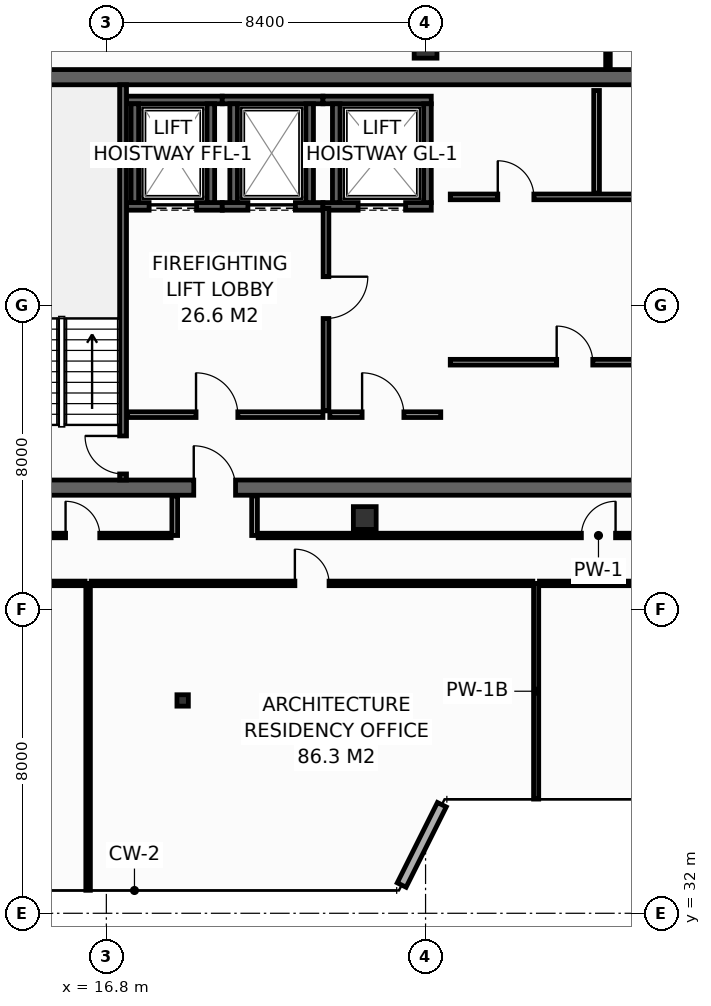
"""IFC4 building model, lengths in metres.
Left out: names, types, materials, properties, quantities, classifications, styles, units other than length and angle.
Written with IfcOpenShell. Run it as: python <this file> out.ifc"""

import sys

from ifc_helpers import new_model, si_unit, direction, frame, frame_2d, origin, origin_2d, place, context, subcontext, project, spatial, rectangle, hollow_rectangle, extrude, element, fill, save


model = new_model("IFC4")
c1 = context("Model", 3, precision=1e-05, world=origin(), true_north=direction((0.0, 1.0)))
c2 = subcontext(c1, "Body", "Model", "MODEL_VIEW")
j1 = project(units=[si_unit("LENGTHUNIT", "METRE"), si_unit("PLANEANGLEUNIT", "RADIAN")], contexts=[c1])
p1 = place(None, origin())
s1 = spatial("IfcSite", under=j1, at=p1, CompositionType="ELEMENT")
p2 = place(p1, origin())
s2 = spatial("IfcBuilding", under=s1, at=p2, CompositionType="ELEMENT")
p3 = place(p2, frame((0.0, 0.0, 302.8)))
s3 = spatial("IfcBuildingStorey", under=s2, at=p3, CompositionType="ELEMENT", Elevation=302.8)
p4 = place(p3, frame((13.7, 43.2, 0.0), z_axis=(0.0, 0.0, 1.0), x_axis=(1.0, 0.0, 0.0)))
e1 = element("IfcWall", 1, at=p4, inside=s3, PredefinedType="SHEAR", context=c2, shape_type="SweptSolid", body=[
    extrude(rectangle(XDim=32.5, YDim=0.4, at=frame_2d((16.25, 0.0))), origin(), (0.0, 0.0, 1.0), 3.55),
])
p5 = place(p4, frame((5.4, 0.0, 0.0)))
e2 = element("IfcOpeningElement", 2, at=p5, cuts=e1, PredefinedType="OPENING", context=c2, shape_type="SweptSolid", body=[
    extrude(rectangle(XDim=1.1, YDim=2.15, at=frame_2d((0.55, 1.075))), frame((0.0, 0.21, 0.0), z_axis=(0.0, -1.0, 0.0), x_axis=(1.0, 0.0, 0.0)), (0.0, 0.0, 1.0), 0.42),
])
p6 = place(p4, frame((25.6, 0.0, 0.0)))
e3 = element("IfcOpeningElement", 3, at=p6, cuts=e1, PredefinedType="OPENING", context=c2, shape_type="SweptSolid", body=[
    extrude(rectangle(XDim=1.1, YDim=2.15, at=frame_2d((0.55, 1.075))), frame((0.0, 0.21, 0.0), z_axis=(0.0, -1.0, 0.0), x_axis=(1.0, 0.0, 0.0)), (0.0, 0.0, 1.0), 0.42),
])
p7 = place(p3, frame((13.7, 54.0, 0.0), z_axis=(0.0, 0.0, 1.0), x_axis=(1.0, 0.0, 0.0)))
e4 = element("IfcWall", 4, at=p7, inside=s3, PredefinedType="SHEAR", context=c2, shape_type="SweptSolid", body=[
    extrude(rectangle(XDim=32.5, YDim=0.4, at=frame_2d((16.25, 0.0))), origin(), (0.0, 0.0, 1.0), 3.55),
])
for number, where, z_axis, x_axis in (
    (5, (25.2, 54.8, 0.0), (0.0, 0.0, 1.0), (1.0, 0.0, 0.0)),
    (6, (23.6, 42.4, 0.0), (0.0, 0.0, 1.0), (1.0, 0.0, 0.0)),
):
    element("IfcColumn", number, at=place(p3, frame(where, z_axis=z_axis, x_axis=x_axis)), inside=s3, PredefinedType="COLUMN", context=c2, shape_type="SweptSolid", body=[
        extrude(hollow_rectangle(XDim=0.6, YDim=0.6, WallThickness=0.028, at=origin_2d()), origin(), (0.0, 0.0, 1.0), 3.8),
    ])
p8 = place(p3, frame((18.808, 37.6, 0.0), z_axis=(0.0, 0.0, 1.0), x_axis=(1.0, 0.0, 0.0)))
e7 = element("IfcColumn", 7, at=p8, inside=s3, PredefinedType="COLUMN", context=c2, shape_type="SweptSolid", body=[
    extrude(hollow_rectangle(XDim=0.3, YDim=0.3, WallThickness=0.012, at=origin_2d()), origin(), (0.0, 0.0, 1.0), 3.8),
])
p9 = place(p3, frame((17.33, 50.6, 0.0), z_axis=(0.0, 0.0, 1.0), x_axis=(1.0, 0.0, 0.0)))
e8 = element("IfcWall", 8, at=p9, inside=s3, PredefinedType="SHEAR", context=c2, shape_type="SweptSolid", body=[
    extrude(rectangle(XDim=2.52, YDim=0.2, at=frame_2d((1.26, 0.0))), origin(), (0.0, 0.0, 1.0), 3.55),
])
p10 = place(p9, frame((0.595, 0.0, 0.0)))
e9 = element("IfcOpeningElement", 9, at=p10, cuts=e8, PredefinedType="OPENING", context=c2, shape_type="SweptSolid", body=[
    extrude(rectangle(XDim=1.25, YDim=2.3, at=frame_2d((0.625, 1.15))), frame((0.0, 0.11, 0.0), z_axis=(0.0, -1.0, 0.0), x_axis=(1.0, 0.0, 0.0)), (0.0, 0.0, 1.0), 0.22),
])
p11 = place(p3, frame((17.33, 53.4, 0.0), z_axis=(0.0, 0.0, 1.0), x_axis=(1.0, 0.0, 0.0)))
e10 = element("IfcWall", 10, at=p11, inside=s3, PredefinedType="SHEAR", context=c2, shape_type="SweptSolid", body=[
    extrude(rectangle(XDim=2.52, YDim=0.2, at=frame_2d((1.26, 0.0))), origin(), (0.0, 0.0, 1.0), 3.55),
])
for number, where, z_axis, x_axis in (
    (11, (17.55, 50.7, 0.0), (0.0, 0.0, 1.0), (0.0, 1.0, 0.0)),
    (12, (19.55, 50.7, 0.0), (0.0, 0.0, 1.0), (0.0, 1.0, 0.0)),
):
    element("IfcWall", number, at=place(p3, frame(where, z_axis=z_axis, x_axis=x_axis)), inside=s3, PredefinedType="SHEAR", context=c2, shape_type="SweptSolid", body=[
        extrude(rectangle(XDim=2.6, YDim=0.2, at=frame_2d((1.3, 0.0))), origin(), (0.0, 0.0, 1.0), 3.55),
    ])
p12 = place(p3, frame((19.85, 50.6, 0.0), z_axis=(0.0, 0.0, 1.0), x_axis=(1.0, 0.0, 0.0)))
e13 = element("IfcWall", 13, at=p12, inside=s3, PredefinedType="SHEAR", context=c2, shape_type="SweptSolid", body=[
    extrude(rectangle(XDim=2.65, YDim=0.2, at=frame_2d((1.325, 0.0))), origin(), (0.0, 0.0, 1.0), 3.55),
])
p13 = place(p12, frame((0.675, 0.0, 0.0)))
e14 = element("IfcOpeningElement", 14, at=p13, cuts=e13, PredefinedType="OPENING", context=c2, shape_type="SweptSolid", body=[
    extrude(rectangle(XDim=1.25, YDim=2.3, at=frame_2d((0.625, 1.15))), frame((0.0, 0.11, 0.0), z_axis=(0.0, -1.0, 0.0), x_axis=(1.0, 0.0, 0.0)), (0.0, 0.0, 1.0), 0.22),
])
p14 = place(p3, frame((19.85, 53.4, 0.0), z_axis=(0.0, 0.0, 1.0), x_axis=(1.0, 0.0, 0.0)))
e15 = element("IfcWall", 15, at=p14, inside=s3, PredefinedType="SHEAR", context=c2, shape_type="SweptSolid", body=[
    extrude(rectangle(XDim=2.65, YDim=0.2, at=frame_2d((1.325, 0.0))), origin(), (0.0, 0.0, 1.0), 3.55),
])
for number, where, z_axis, x_axis in (
    (16, (20.15, 50.7, 0.0), (0.0, 0.0, 1.0), (0.0, 1.0, 0.0)),
    (17, (22.15, 50.7, 0.0), (0.0, 0.0, 1.0), (0.0, 1.0, 0.0)),
):
    element("IfcWall", number, at=place(p3, frame(where, z_axis=z_axis, x_axis=x_axis)), inside=s3, PredefinedType="SHEAR", context=c2, shape_type="SweptSolid", body=[
        extrude(rectangle(XDim=2.6, YDim=0.2, at=frame_2d((1.3, 0.0))), origin(), (0.0, 0.0, 1.0), 3.55),
    ])
p15 = place(p3, frame((22.5, 50.6, 0.0), z_axis=(0.0, 0.0, 1.0), x_axis=(1.0, 0.0, 0.0)))
e18 = element("IfcWall", 18, at=p15, inside=s3, PredefinedType="SHEAR", context=c2, shape_type="SweptSolid", body=[
    extrude(rectangle(XDim=2.85, YDim=0.2, at=frame_2d((1.425, 0.0))), origin(), (0.0, 0.0, 1.0), 3.55),
])
p16 = place(p15, frame((0.925, 0.0, 0.0)))
e19 = element("IfcOpeningElement", 19, at=p16, cuts=e18, PredefinedType="OPENING", context=c2, shape_type="SweptSolid", body=[
    extrude(rectangle(XDim=1.25, YDim=2.3, at=frame_2d((0.625, 1.15))), frame((0.0, 0.11, 0.0), z_axis=(0.0, -1.0, 0.0), x_axis=(1.0, 0.0, 0.0)), (0.0, 0.0, 1.0), 0.22),
])
p17 = place(p3, frame((22.5, 53.4, 0.0), z_axis=(0.0, 0.0, 1.0), x_axis=(1.0, 0.0, 0.0)))
e20 = element("IfcWall", 20, at=p17, inside=s3, PredefinedType="SHEAR", context=c2, shape_type="SweptSolid", body=[
    extrude(rectangle(XDim=2.85, YDim=0.2, at=frame_2d((1.425, 0.0))), origin(), (0.0, 0.0, 1.0), 3.55),
])
for number, where, z_axis, x_axis in (
    (21, (22.85, 50.7, 0.0), (0.0, 0.0, 1.0), (0.0, 1.0, 0.0)),
    (22, (25.25, 50.7, 0.0), (0.0, 0.0, 1.0), (0.0, 1.0, 0.0)),
):
    element("IfcWall", number, at=place(p3, frame(where, z_axis=z_axis, x_axis=x_axis)), inside=s3, PredefinedType="SHEAR", context=c2, shape_type="SweptSolid", body=[
        extrude(rectangle(XDim=2.6, YDim=0.2, at=frame_2d((1.3, 0.0))), origin(), (0.0, 0.0, 1.0), 3.55),
    ])
p18 = place(p3, frame((17.24, 43.4, 0.0), z_axis=(0.0, 0.0, 1.0), x_axis=(0.0, 1.0, 0.0)))
e23 = element("IfcWall", 23, at=p18, inside=s3, PredefinedType="SHEAR", context=c2, shape_type="SweptSolid", body=[
    extrude(rectangle(XDim=10.4, YDim=0.18, at=frame_2d((5.2, 0.0))), origin(), (0.0, 0.0, 1.0), 3.55),
])
p19 = place(p18, frame((0.16, 0.0, 0.0)))
e24 = element("IfcOpeningElement", 24, at=p19, cuts=e23, PredefinedType="OPENING", context=c2, shape_type="SweptSolid", body=[
    extrude(rectangle(XDim=1.0, YDim=2.15, at=frame_2d((0.5, 1.075))), frame((0.0, 0.1, 0.0), z_axis=(0.0, -1.0, 0.0), x_axis=(1.0, 0.0, 0.0)), (0.0, 0.0, 1.0), 0.2),
])
p20 = place(p3, frame((17.36, 45.12, 0.0), z_axis=(0.0, 0.0, 1.0), x_axis=(1.0, 0.0, 0.0)))
e25 = element("IfcWall", 25, at=p20, inside=s3, PredefinedType="PARTITIONING", context=c2, shape_type="SweptSolid", body=[
    extrude(rectangle(XDim=5.14, YDim=0.15, at=frame_2d((2.57, 0.0))), origin(), (0.0, 0.0, 1.0), 3.55),
])
p21 = place(p20, frame((1.8, 0.0, 0.0)))
e26 = element("IfcOpeningElement", 26, at=p21, cuts=e25, PredefinedType="OPENING", context=c2, shape_type="SweptSolid", body=[
    extrude(rectangle(XDim=1.1, YDim=2.15, at=frame_2d((0.55, 1.075))), frame((0.0, 0.085, 0.0), z_axis=(0.0, -1.0, 0.0), x_axis=(1.0, 0.0, 0.0)), (0.0, 0.0, 1.0), 0.17),
])
p22 = place(p3, frame((22.58, 50.55, 0.0), z_axis=(0.0, 0.0, 1.0), x_axis=(0.0, -1.0, 0.0)))
e27 = element("IfcWall", 27, at=p22, inside=s3, PredefinedType="PARTITIONING", context=c2, shape_type="SweptSolid", body=[
    extrude(rectangle(XDim=5.33, YDim=0.15, at=frame_2d((2.665, 0.0))), origin(), (0.0, 0.0, 1.0), 3.55),
])
p23 = place(p22, frame((1.8, 0.0, 0.0)))
e28 = element("IfcOpeningElement", 28, at=p23, cuts=e27, PredefinedType="OPENING", context=c2, shape_type="SweptSolid", body=[
    extrude(rectangle(XDim=1.1, YDim=2.15, at=frame_2d((0.55, 1.075))), frame((0.0, 0.085, 0.0), z_axis=(0.0, -1.0, 0.0), x_axis=(1.0, 0.0, 0.0)), (0.0, 0.0, 1.0), 0.17),
])
p24 = place(p3, frame((22.68, 45.12, 0.0), z_axis=(0.0, 0.0, 1.0), x_axis=(1.0, 0.0, 0.0)))
e29 = element("IfcWall", 29, at=p24, inside=s3, PredefinedType="PARTITIONING", context=c2, shape_type="SweptSolid", body=[
    extrude(rectangle(XDim=2.92, YDim=0.15, at=frame_2d((1.46, 0.0))), origin(), (0.0, 0.0, 1.0), 3.55),
])
p25 = place(p24, frame((0.85, 0.0, 0.0)))
e30 = element("IfcOpeningElement", 30, at=p25, cuts=e29, PredefinedType="OPENING", context=c2, shape_type="SweptSolid", body=[
    extrude(rectangle(XDim=1.1, YDim=2.15, at=frame_2d((0.55, 1.075))), frame((0.0, 0.085, 0.0), z_axis=(0.0, -1.0, 0.0), x_axis=(1.0, 0.0, 0.0)), (0.0, 0.0, 1.0), 0.17),
])
p26 = place(p3, frame((25.85, 50.85, 0.0), z_axis=(0.0, 0.0, 1.0), x_axis=(1.0, 0.0, 0.0)))
e31 = element("IfcWall", 31, at=p26, inside=s3, PredefinedType="PARTITIONING", context=c2, shape_type="SweptSolid", body=[
    extrude(rectangle(XDim=7.65, YDim=0.15, at=frame_2d((3.825, 0.0))), origin(), (0.0, 0.0, 1.0), 3.55),
])
p27 = place(p26, frame((1.25, 0.0, 0.0)))
e32 = element("IfcOpeningElement", 32, at=p27, cuts=e31, PredefinedType="OPENING", context=c2, shape_type="SweptSolid", body=[
    extrude(rectangle(XDim=0.95, YDim=2.15, at=frame_2d((0.475, 1.075))), frame((0.0, 0.085, 0.0), z_axis=(0.0, -1.0, 0.0), x_axis=(1.0, 0.0, 0.0)), (0.0, 0.0, 1.0), 0.17),
])
p28 = place(p26, frame((5.05, 0.0, 0.0)))
e33 = element("IfcOpeningElement", 33, at=p28, cuts=e31, PredefinedType="OPENING", context=c2, shape_type="SweptSolid", body=[
    extrude(rectangle(XDim=0.95, YDim=2.15, at=frame_2d((0.475, 1.075))), frame((0.0, 0.085, 0.0), z_axis=(0.0, -1.0, 0.0), x_axis=(1.0, 0.0, 0.0)), (0.0, 0.0, 1.0), 0.17),
])
p29 = place(p3, frame((29.7, 50.95, 0.0), z_axis=(0.0, 0.0, 1.0), x_axis=(0.0, 1.0, 0.0)))
e34 = element("IfcWall", 34, at=p29, inside=s3, PredefinedType="PARTITIONING", context=c2, shape_type="SweptSolid", body=[
    extrude(rectangle(XDim=2.7, YDim=0.15, at=frame_2d((1.35, 0.0))), origin(), (0.0, 0.0, 1.0), 3.55),
])
p30 = place(p3, frame((25.85, 46.5, 0.0), z_axis=(0.0, 0.0, 1.0), x_axis=(1.0, 0.0, 0.0)))
e35 = element("IfcWall", 35, at=p30, inside=s3, PredefinedType="PARTITIONING", context=c2, shape_type="SweptSolid", body=[
    extrude(rectangle(XDim=7.65, YDim=0.15, at=frame_2d((3.825, 0.0))), origin(), (0.0, 0.0, 1.0), 3.55),
])
p31 = place(p30, frame((2.8, 0.0, 0.0)))
e36 = element("IfcOpeningElement", 36, at=p31, cuts=e35, PredefinedType="OPENING", context=c2, shape_type="SweptSolid", body=[
    extrude(rectangle(XDim=0.95, YDim=2.15, at=frame_2d((0.475, 1.075))), frame((0.0, 0.085, 0.0), z_axis=(0.0, -1.0, 0.0), x_axis=(1.0, 0.0, 0.0)), (0.0, 0.0, 1.0), 0.17),
])
p32 = place(p3, frame((24.572, 32.743, 0.0), z_axis=(0.0, 0.0, 1.0), x_axis=(0.4472135955, 0.894427191, 0.0)))
e37 = element("IfcWall", 37, at=p32, inside=s3, PredefinedType="STANDARD", context=c2, shape_type="SweptSolid", body=[
    extrude(rectangle(XDim=2.363, YDim=0.26, at=frame_2d((1.182, 0.0))), origin(), (0.0, 0.0, 1.0), 3.55),
])
p33 = place(p3, frame((30.0, 54.22, 0.0), z_axis=(0.0, 0.0, 1.0), x_axis=(0.0, 1.0, 0.0)))
e38 = element("IfcWall", 38, at=p33, inside=s3, PredefinedType="PARTITIONING", context=c2, shape_type="SweptSolid", body=[
    extrude(rectangle(XDim=1.775, YDim=0.12, at=frame_2d((0.888, 0.0))), origin(), (0.0, 0.0, 1.0), 2.935),
])
for number, where, z_axis, x_axis in (
    (39, (18.6, 41.94, 0.0), (0.0, 0.0, 1.0), (0.0, 1.0, 0.0)),
    (40, (20.7, 41.94, 0.0), (0.0, 0.0, 1.0), (0.0, 1.0, 0.0)),
):
    element("IfcWall", number, at=place(p3, frame(where, z_axis=z_axis, x_axis=x_axis)), inside=s3, PredefinedType="PARTITIONING", context=c2, shape_type="SweptSolid", body=[
        extrude(rectangle(XDim=1.04, YDim=0.15, at=frame_2d((0.52, 0.0))), origin(), (0.0, 0.0, 1.0), 3.55),
    ])
p34 = place(p3, frame((13.85, 41.94, 0.0), z_axis=(0.0, 0.0, 1.0), x_axis=(1.0, 0.0, 0.0)))
e41 = element("IfcWall", 41, at=p34, inside=s3, PredefinedType="PARTITIONING", context=c2, shape_type="SweptSolid", body=[
    extrude(rectangle(XDim=4.655, YDim=0.12, at=frame_2d((2.327, 0.0))), origin(), (0.0, 0.0, 1.0), 3.55),
])
p35 = place(p34, frame((1.877, 0.0, 0.0)))
e42 = element("IfcOpeningElement", 42, at=p35, cuts=e41, PredefinedType="OPENING", context=c2, shape_type="SweptSolid", body=[
    extrude(rectangle(XDim=0.9, YDim=2.1, at=frame_2d((0.45, 1.05))), frame((0.0, 0.07, 0.0), z_axis=(0.0, -1.0, 0.0), x_axis=(1.0, 0.0, 0.0)), (0.0, 0.0, 1.0), 0.14),
])
p36 = place(p3, frame((20.795, 41.94, 0.0), z_axis=(0.0, 0.0, 1.0), x_axis=(1.0, 0.0, 0.0)))
e43 = element("IfcWall", 43, at=p36, inside=s3, PredefinedType="PARTITIONING", context=c2, shape_type="SweptSolid", body=[
    extrude(rectangle(XDim=17.91, YDim=0.12, at=frame_2d((8.955, 0.0))), origin(), (0.0, 0.0, 1.0), 3.047),
])
p37 = place(p36, frame((8.505, 0.0, 0.0)))
e44 = element("IfcOpeningElement", 44, at=p37, cuts=e43, PredefinedType="OPENING", context=c2, shape_type="SweptSolid", body=[
    extrude(rectangle(XDim=0.9, YDim=2.1, at=frame_2d((0.45, 1.05))), frame((0.0, 0.07, 0.0), z_axis=(0.0, -1.0, 0.0), x_axis=(1.0, 0.0, 0.0)), (0.0, 0.0, 1.0), 0.14),
])
p38 = place(p3, frame((16.32, 32.605, 0.0), z_axis=(0.0, 0.0, 1.0), x_axis=(0.0, 1.0, 0.0)))
e45 = element("IfcWall", 45, at=p38, inside=s3, PredefinedType="PARTITIONING", context=c2, shape_type="SweptSolid", body=[
    extrude(rectangle(XDim=8.075, YDim=0.12, at=frame_2d((4.038, 0.0))), origin(), (0.0, 0.0, 1.0), 3.047),
])
p39 = place(p3, frame((28.11, 35.005, 0.0), z_axis=(0.0, 0.0, 1.0), x_axis=(0.0, 1.0, 0.0)))
e46 = element("IfcWall", 46, at=p39, inside=s3, PredefinedType="PARTITIONING", context=c2, shape_type="SweptSolid", body=[
    extrude(rectangle(XDim=5.675, YDim=0.135, at=frame_2d((2.837, 0.0))), origin(), (0.0, 0.0, 1.0), 3.55),
])
p40 = place(p3, frame((6.415, 40.68, 0.0), z_axis=(0.0, 0.0, 1.0), x_axis=(1.0, 0.0, 0.0)))
e47 = element("IfcWall", 47, at=p40, inside=s3, PredefinedType="PARTITIONING", context=c2, shape_type="SweptSolid", body=[
    extrude(rectangle(XDim=9.825, YDim=0.12, at=frame_2d((4.913, 0.0))), origin(), (0.0, 0.0, 1.0), 3.085),
])
p41 = place(p40, frame((4.463, 0.0, 0.0)))
e48 = element("IfcOpeningElement", 48, at=p41, cuts=e47, PredefinedType="OPENING", context=c2, shape_type="SweptSolid", body=[
    extrude(rectangle(XDim=0.9, YDim=2.1, at=frame_2d((0.45, 1.05))), frame((0.0, 0.07, 0.0), z_axis=(0.0, -1.0, 0.0), x_axis=(1.0, 0.0, 0.0)), (0.0, 0.0, 1.0), 0.14),
])
p42 = place(p3, frame((16.4, 40.68, 0.0), z_axis=(0.0, 0.0, 1.0), x_axis=(1.0, 0.0, 0.0)))
e49 = element("IfcWall", 49, at=p42, inside=s3, PredefinedType="PARTITIONING", context=c2, shape_type="SweptSolid", body=[
    extrude(rectangle(XDim=11.623, YDim=0.12, at=frame_2d((5.811, 0.0))), origin(), (0.0, 0.0, 1.0), 3.047),
])
p43 = place(p42, frame((5.361, 0.0, 0.0)))
e50 = element("IfcOpeningElement", 50, at=p43, cuts=e49, PredefinedType="OPENING", context=c2, shape_type="SweptSolid", body=[
    extrude(rectangle(XDim=0.9, YDim=2.1, at=frame_2d((0.45, 1.05))), frame((0.0, 0.07, 0.0), z_axis=(0.0, -1.0, 0.0), x_axis=(1.0, 0.0, 0.0)), (0.0, 0.0, 1.0), 0.14),
])
p44 = place(p3, frame((28.198, 40.68, 0.0), z_axis=(0.0, 0.0, 1.0), x_axis=(1.0, 0.0, 0.0)))
e51 = element("IfcWall", 51, at=p44, inside=s3, PredefinedType="PARTITIONING", context=c2, shape_type="SweptSolid", body=[
    extrude(rectangle(XDim=11.633, YDim=0.12, at=frame_2d((5.816, 0.0))), origin(), (0.0, 0.0, 1.0), 3.047),
])
p45 = place(p44, frame((5.366, 0.0, 0.0)))
e52 = element("IfcOpeningElement", 52, at=p45, cuts=e51, PredefinedType="OPENING", context=c2, shape_type="SweptSolid", body=[
    extrude(rectangle(XDim=0.9, YDim=2.1, at=frame_2d((0.45, 1.05))), frame((0.0, 0.07, 0.0), z_axis=(0.0, -1.0, 0.0), x_axis=(1.0, 0.0, 0.0)), (0.0, 0.0, 1.0), 0.14),
])
p46 = place(p10, origin())
e53 = element("IfcDoor", 53, at=p46, inside=s3, OperationType="SLIDING_TO_LEFT", PredefinedType="DOOR", context=c2, shape_type="SweptSolid", body=[
    extrude(rectangle(XDim=1.25, YDim=2.3, at=frame_2d((0.625, 1.15))), frame((0.0, 0.025, 0.0), z_axis=(0.0, -1.0, 0.0), x_axis=(1.0, 0.0, 0.0)), (0.0, 0.0, 1.0), 0.05),
])
fill(e9, e53)
p47 = place(p13, origin())
e54 = element("IfcDoor", 54, at=p47, inside=s3, OperationType="SLIDING_TO_LEFT", PredefinedType="DOOR", context=c2, shape_type="SweptSolid", body=[
    extrude(rectangle(XDim=1.25, YDim=2.3, at=frame_2d((0.625, 1.15))), frame((0.0, 0.025, 0.0), z_axis=(0.0, -1.0, 0.0), x_axis=(1.0, 0.0, 0.0)), (0.0, 0.0, 1.0), 0.05),
])
fill(e14, e54)
p48 = place(p16, origin())
e55 = element("IfcDoor", 55, at=p48, inside=s3, OperationType="SLIDING_TO_LEFT", PredefinedType="DOOR", context=c2, shape_type="SweptSolid", body=[
    extrude(rectangle(XDim=1.25, YDim=2.3, at=frame_2d((0.625, 1.15))), frame((0.0, 0.025, 0.0), z_axis=(0.0, -1.0, 0.0), x_axis=(1.0, 0.0, 0.0)), (0.0, 0.0, 1.0), 0.05),
])
fill(e19, e55)
p49 = place(p19, origin())
e56 = element("IfcDoor", 56, at=p49, inside=s3, OperationType="SINGLE_SWING_RIGHT", PredefinedType="DOOR", context=c2, shape_type="SweptSolid", body=[
    extrude(rectangle(XDim=1.0, YDim=2.15, at=frame_2d((0.5, 1.075))), frame((0.0, 0.025, 0.0), z_axis=(0.0, -1.0, 0.0), x_axis=(1.0, 0.0, 0.0)), (0.0, 0.0, 1.0), 0.05),
])
fill(e24, e56)
p50 = place(p21, origin())
e57 = element("IfcDoor", 57, at=p50, inside=s3, OperationType="SINGLE_SWING_LEFT", PredefinedType="DOOR", context=c2, shape_type="SweptSolid", body=[
    extrude(rectangle(XDim=1.1, YDim=2.15, at=frame_2d((0.55, 1.075))), frame((0.0, 0.025, 0.0), z_axis=(0.0, -1.0, 0.0), x_axis=(1.0, 0.0, 0.0)), (0.0, 0.0, 1.0), 0.05),
])
fill(e26, e57)
p51 = place(p23, origin())
e58 = element("IfcDoor", 58, at=p51, inside=s3, OperationType="SINGLE_SWING_LEFT", PredefinedType="DOOR", context=c2, shape_type="SweptSolid", body=[
    extrude(rectangle(XDim=1.1, YDim=2.15, at=frame_2d((0.55, 1.075))), frame((0.0, 0.025, 0.0), z_axis=(0.0, -1.0, 0.0), x_axis=(1.0, 0.0, 0.0)), (0.0, 0.0, 1.0), 0.05),
])
fill(e28, e58)
p52 = place(p25, origin())
e59 = element("IfcDoor", 59, at=p52, inside=s3, OperationType="SINGLE_SWING_LEFT", PredefinedType="DOOR", context=c2, shape_type="SweptSolid", body=[
    extrude(rectangle(XDim=1.1, YDim=2.15, at=frame_2d((0.55, 1.075))), frame((0.0, 0.025, 0.0), z_axis=(0.0, -1.0, 0.0), x_axis=(1.0, 0.0, 0.0)), (0.0, 0.0, 1.0), 0.05),
])
fill(e30, e59)
p53 = place(p5, origin())
e60 = element("IfcDoor", 60, at=p53, inside=s3, OperationType="SINGLE_SWING_LEFT", PredefinedType="DOOR", context=c2, shape_type="SweptSolid", body=[
    extrude(rectangle(XDim=1.1, YDim=2.15, at=frame_2d((0.55, 1.075))), frame((0.0, 0.025, 0.0), z_axis=(0.0, -1.0, 0.0), x_axis=(1.0, 0.0, 0.0)), (0.0, 0.0, 1.0), 0.05),
])
fill(e2, e60)
p54 = place(p27, origin())
e61 = element("IfcDoor", 61, at=p54, inside=s3, OperationType="SINGLE_SWING_LEFT", PredefinedType="DOOR", context=c2, shape_type="SweptSolid", body=[
    extrude(rectangle(XDim=0.95, YDim=2.15, at=frame_2d((0.475, 1.075))), frame((0.0, 0.025, 0.0), z_axis=(0.0, -1.0, 0.0), x_axis=(1.0, 0.0, 0.0)), (0.0, 0.0, 1.0), 0.05),
])
fill(e32, e61)
p55 = place(p31, origin())
e62 = element("IfcDoor", 62, at=p55, inside=s3, OperationType="SINGLE_SWING_LEFT", PredefinedType="DOOR", context=c2, shape_type="SweptSolid", body=[
    extrude(rectangle(XDim=0.95, YDim=2.15, at=frame_2d((0.475, 1.075))), frame((0.0, 0.025, 0.0), z_axis=(0.0, -1.0, 0.0), x_axis=(1.0, 0.0, 0.0)), (0.0, 0.0, 1.0), 0.05),
])
fill(e36, e62)
p56 = place(p35, origin())
e63 = element("IfcDoor", 63, at=p56, inside=s3, OperationType="SINGLE_SWING_LEFT", PredefinedType="DOOR", context=c2, shape_type="SweptSolid", body=[
    extrude(rectangle(XDim=0.9, YDim=2.1, at=frame_2d((0.45, 1.05))), frame((0.0, 0.025, 0.0), z_axis=(0.0, -1.0, 0.0), x_axis=(1.0, 0.0, 0.0)), (0.0, 0.0, 1.0), 0.05),
])
fill(e42, e63)
p57 = place(p37, origin())
e64 = element("IfcDoor", 64, at=p57, inside=s3, OperationType="SINGLE_SWING_RIGHT", PredefinedType="DOOR", context=c2, shape_type="SweptSolid", body=[
    extrude(rectangle(XDim=0.9, YDim=2.1, at=frame_2d((0.45, 1.05))), frame((0.0, 0.025, 0.0), z_axis=(0.0, -1.0, 0.0), x_axis=(1.0, 0.0, 0.0)), (0.0, 0.0, 1.0), 0.05),
])
fill(e44, e64)
p58 = place(p43, origin())
e65 = element("IfcDoor", 65, at=p58, inside=s3, OperationType="SINGLE_SWING_LEFT", PredefinedType="DOOR", context=c2, shape_type="SweptSolid", body=[
    extrude(rectangle(XDim=0.9, YDim=2.1, at=frame_2d((0.45, 1.05))), frame((0.0, 0.025, 0.0), z_axis=(0.0, -1.0, 0.0), x_axis=(1.0, 0.0, 0.0)), (0.0, 0.0, 1.0), 0.05),
])
fill(e50, e65)
save(model, sys.argv[1])
